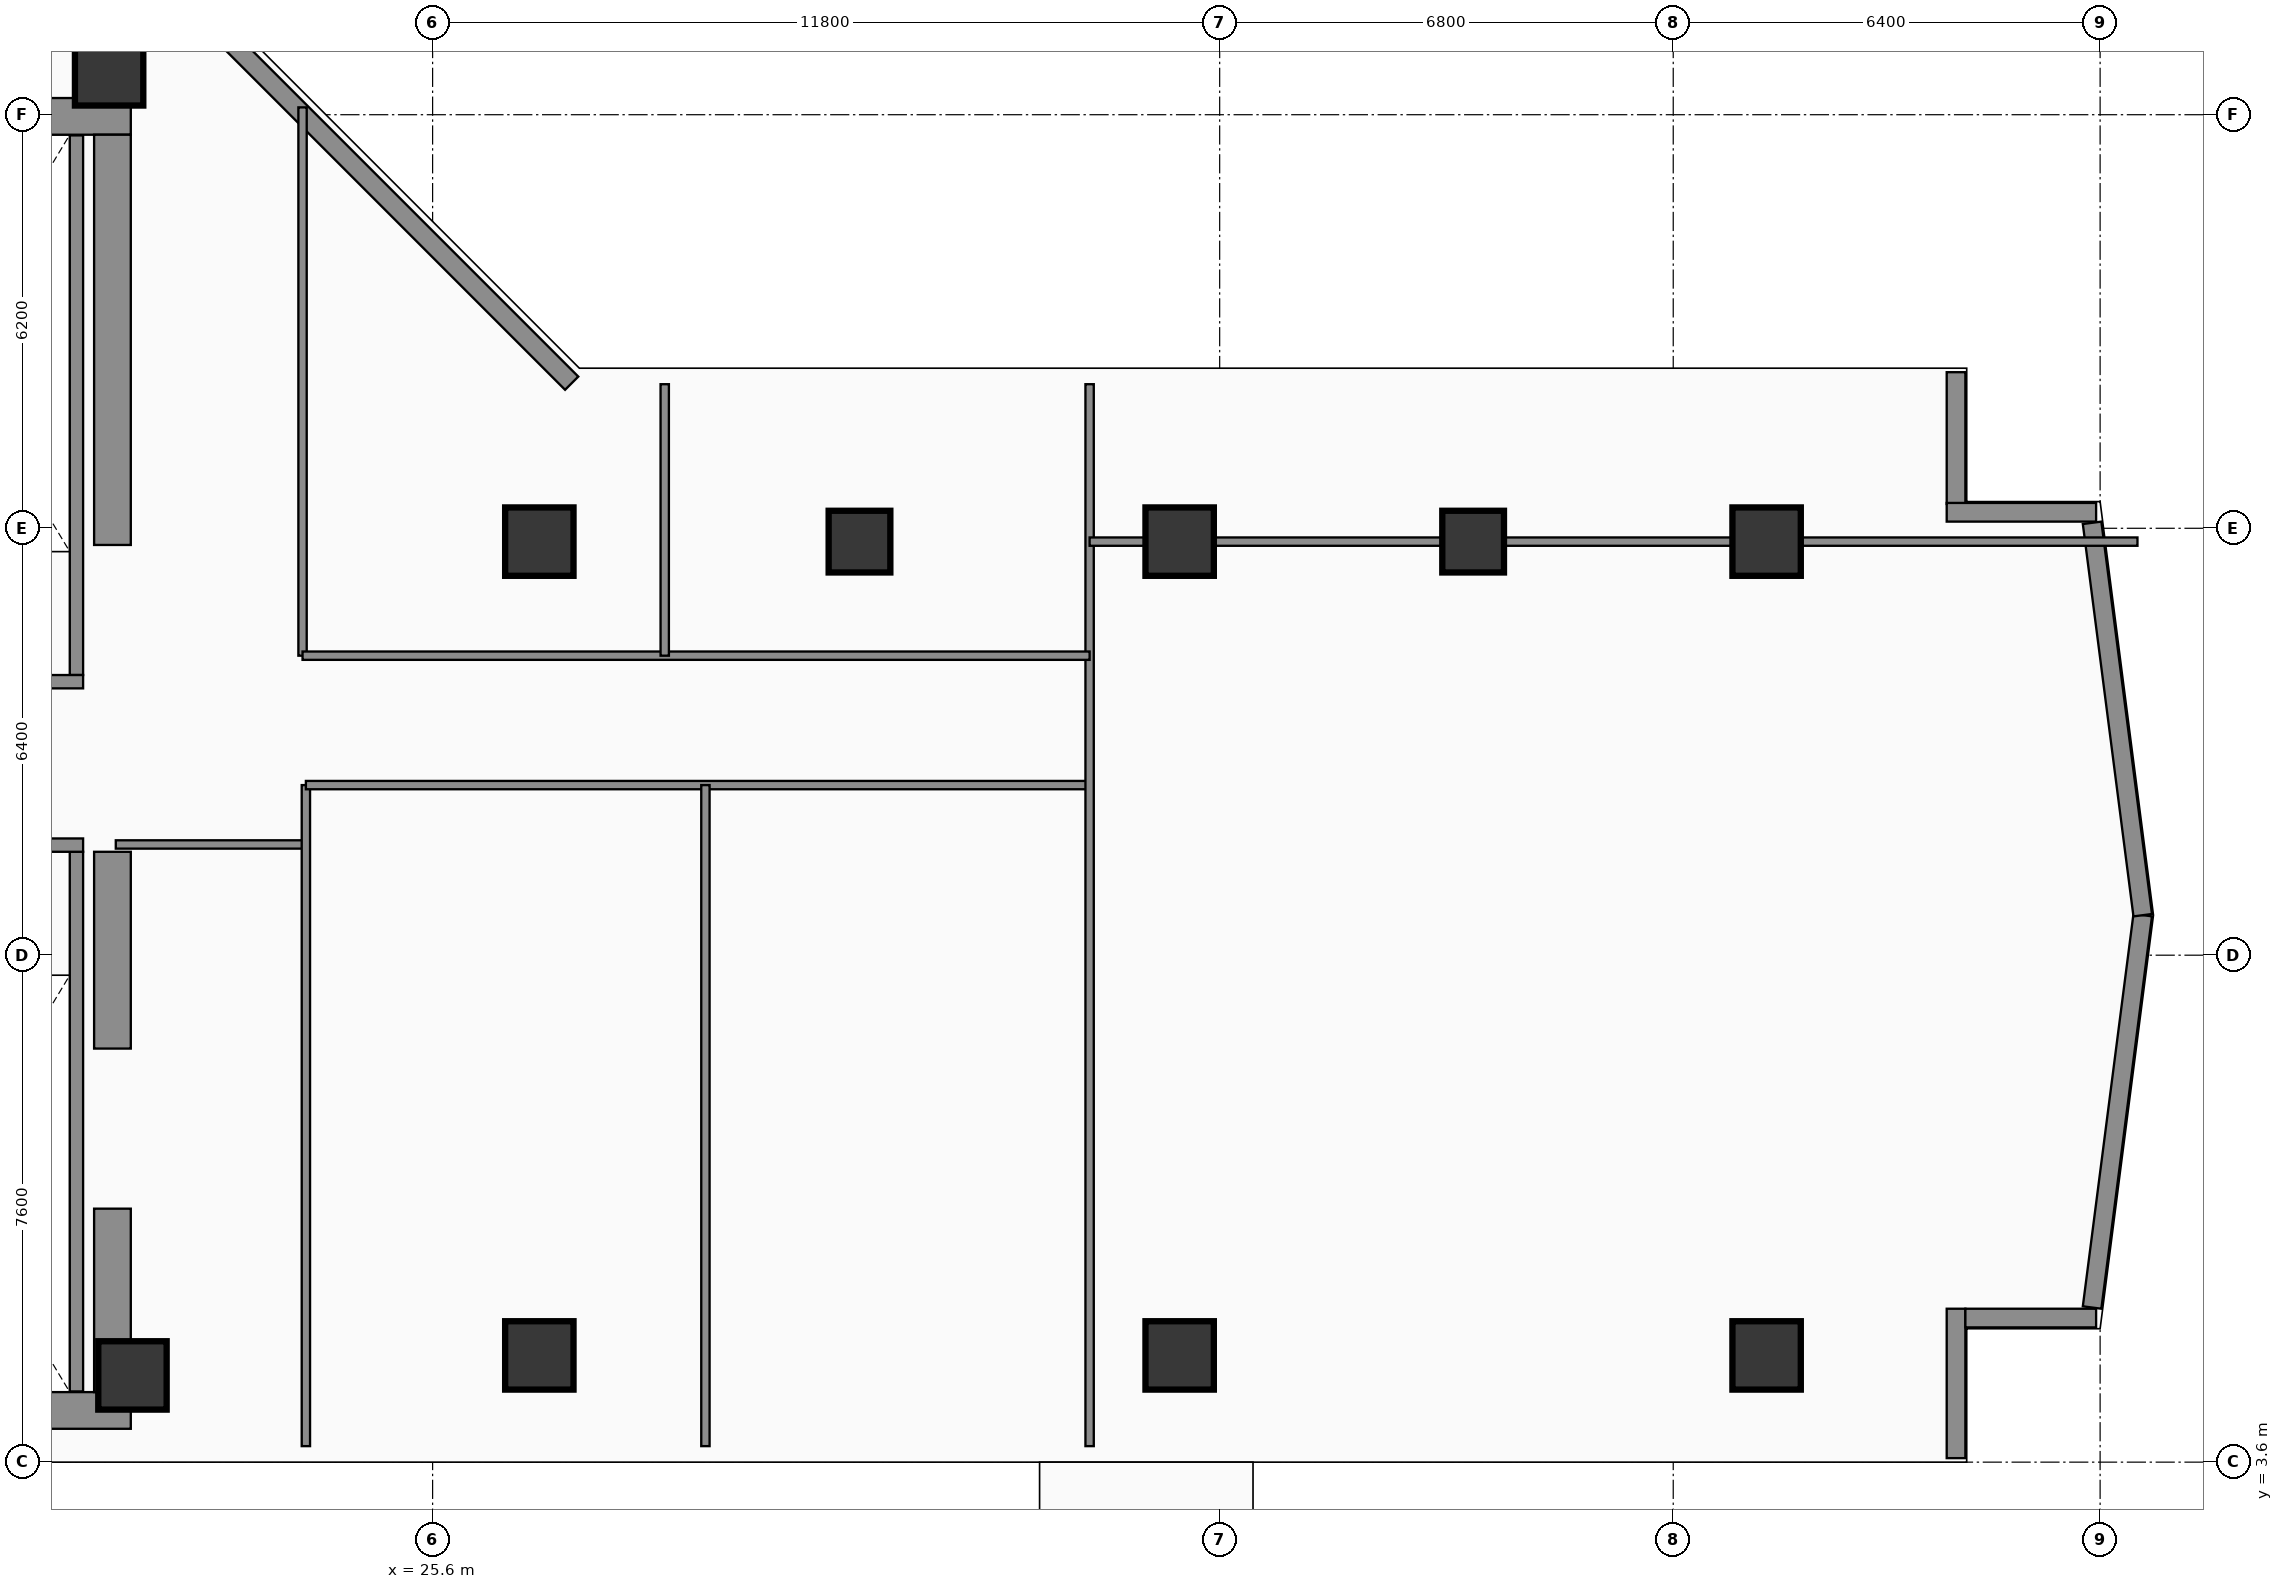
"""IFC4 building model, lengths in metres.
Left out: names, types, materials, properties, quantities, classifications, styles, units other than length and angle.
Written with IfcOpenShell. Run it as: python <this file> out.ifc"""

import sys

from ifc_helpers import new_model, si_unit, direction, frame, frame_2d, origin, origin_2d, place, context, subcontext, project, spatial, rectangle, extrude, element, fill, save


model = new_model("IFC4")
c1 = context("Model", 3, precision=1e-05, world=origin(), true_north=direction((0.0, 1.0)))
c2 = subcontext(c1, "Body", "Model", "MODEL_VIEW")
j1 = project(units=[si_unit("LENGTHUNIT", "METRE"), si_unit("PLANEANGLEUNIT", "RADIAN")], contexts=[c1])
p1 = place(None, origin())
s1 = spatial("IfcSite", under=j1, at=p1, CompositionType="ELEMENT")
p2 = place(p1, origin())
s2 = spatial("IfcBuilding", under=s1, at=p2, CompositionType="ELEMENT")
p3 = place(p2, frame((0.0, 0.0, 223.5)))
s3 = spatial("IfcBuildingStorey", under=s2, at=p3, CompositionType="ELEMENT", Elevation=223.5)
for number, where, z_axis, x_axis in (
    (1, (7.175, 4.375, 0.0), (0.0, 0.0, 1.0), (1.0, 0.0, 0.0)),
    (2, (7.175, 23.775, 0.0), (0.0, 0.0, 1.0), (1.0, 0.0, 0.0)),
):
    element("IfcWall", number, at=place(p3, frame(where, z_axis=z_axis, x_axis=x_axis)), inside=s3, PredefinedType="SHEAR", context=c2, shape_type="SweptSolid", body=[
        extrude(rectangle(XDim=13.9, YDim=0.55, at=frame_2d((6.95, 0.0))), origin(), (0.0, 0.0, 1.0), 3.56),
    ])
p4 = place(p3, frame((20.8, 4.65, 0.0), z_axis=(0.0, 0.0, 1.0), x_axis=(0.0, 1.0, 0.0)))
e3 = element("IfcWall", 3, at=p4, inside=s3, PredefinedType="SHEAR", context=c2, shape_type="SweptSolid", body=[
    extrude(rectangle(XDim=2.75, YDim=0.55, at=frame_2d((1.375, 0.0))), origin(), (0.0, 0.0, 1.0), 3.56),
])
p5 = place(p3, frame((20.8, 9.8, 0.0), z_axis=(0.0, 0.0, 1.0), x_axis=(0.0, 1.0, 0.0)))
e4 = element("IfcWall", 4, at=p5, inside=s3, PredefinedType="SHEAR", context=c2, shape_type="SweptSolid", body=[
    extrude(rectangle(XDim=2.95, YDim=0.55, at=frame_2d((1.475, 0.0))), origin(), (0.0, 0.0, 1.0), 3.56),
])
p6 = place(p3, frame((20.8, 17.35, 0.0), z_axis=(0.0, 0.0, 1.0), x_axis=(0.0, 1.0, 0.0)))
e5 = element("IfcWall", 5, at=p6, inside=s3, PredefinedType="SHEAR", context=c2, shape_type="SweptSolid", body=[
    extrude(rectangle(XDim=6.15, YDim=0.55, at=frame_2d((3.075, 0.0))), origin(), (0.0, 0.0, 1.0), 3.56),
])
for number, where, z_axis, x_axis in (
    (6, (21.1, 4.9, 0.0), (0.0, 0.0, 1.0), (1.0, 0.0, 0.0)),
    (7, (20.75, 24.45, 0.0), (0.0, 0.0, 1.0), (1.0, 0.0, 0.0)),
    (8, (27.2, 5.2, 0.0), (0.0, 0.0, 1.0), (1.0, 0.0, 0.0)),
    (9, (36.8, 5.2, 0.0), (0.0, 0.0, 1.0), (1.0, 0.0, 0.0)),
    (10, (45.6, 5.2, 0.0), (0.0, 0.0, 1.0), (1.0, 0.0, 0.0)),
    (11, (27.2, 17.4, 0.0), (0.0, 0.0, 1.0), (1.0, 0.0, 0.0)),
    (12, (36.8, 17.4, 0.0), (0.0, 0.0, 1.0), (1.0, 0.0, 0.0)),
    (13, (45.6, 17.4, 0.0), (0.0, 0.0, 1.0), (1.0, 0.0, 0.0)),
):
    element("IfcColumn", number, at=place(p3, frame(where, z_axis=z_axis, x_axis=x_axis)), inside=s3, PredefinedType="COLUMN", context=c2, shape_type="SweptSolid", body=[
        extrude(rectangle(XDim=1.0, YDim=1.0, at=origin_2d()), origin(), (0.0, 0.0, 1.0), 3.56),
    ])
for number, where, z_axis, x_axis in (
    (14, (32.0, 17.4, 0.0), (0.0, 0.0, 1.0), (1.0, 0.0, 0.0)),
    (15, (41.2, 17.4, 0.0), (0.0, 0.0, 1.0), (1.0, 0.0, 0.0)),
):
    element("IfcColumn", number, at=place(p3, frame(where, z_axis=z_axis, x_axis=x_axis)), inside=s3, PredefinedType="COLUMN", context=c2, shape_type="SweptSolid", body=[
        extrude(rectangle(XDim=0.9, YDim=0.9, at=origin_2d()), origin(), (0.0, 0.0, 1.0), 3.56),
    ])
p7 = place(p3, frame((48.44, 3.66, 0.0), z_axis=(0.0, 0.0, 1.0), x_axis=(0.0, 1.0, 0.0)))
e16 = element("IfcWall", 16, at=p7, inside=s3, PredefinedType="SOLIDWALL", context=c2, shape_type="SweptSolid", body=[
    extrude(rectangle(XDim=2.24, YDim=0.28, at=frame_2d((1.12, 0.0))), origin(), (0.0, 0.0, 1.0), 3.56),
])
p8 = place(p3, frame((48.58, 5.76, 0.0), z_axis=(0.0, 0.0, 1.0), x_axis=(1.0, 0.0, 0.0)))
e17 = element("IfcWall", 17, at=p8, inside=s3, PredefinedType="SOLIDWALL", context=c2, shape_type="SweptSolid", body=[
    extrude(rectangle(XDim=1.96, YDim=0.28, at=frame_2d((0.98, 0.0))), origin(), (0.0, 0.0, 1.0), 3.56),
])
p9 = place(p3, frame((48.44, 17.965, 0.0), z_axis=(0.0, 0.0, 1.0), x_axis=(0.0, 1.0, 0.0)))
e18 = element("IfcWall", 18, at=p9, inside=s3, PredefinedType="SOLIDWALL", context=c2, shape_type="SweptSolid", body=[
    extrude(rectangle(XDim=1.975, YDim=0.28, at=frame_2d((0.987, 0.0))), origin(), (0.0, 0.0, 1.0), 3.56),
])
p10 = place(p3, frame((48.3, 17.84, 0.0), z_axis=(0.0, 0.0, 1.0), x_axis=(1.0, 0.0, 0.0)))
e19 = element("IfcWall", 19, at=p10, inside=s3, PredefinedType="SOLIDWALL", context=c2, shape_type="SweptSolid", body=[
    extrude(rectangle(XDim=2.24, YDim=0.28, at=frame_2d((1.12, 0.0))), origin(), (0.0, 0.0, 1.0), 3.56),
])
p11 = place(p3, frame((27.685, 19.775, 0.0), z_axis=(0.0, 0.0, 1.0), x_axis=(-0.707106781187, 0.707106781187, 0.0)))
e20 = element("IfcWall", 20, at=p11, inside=s3, PredefinedType="SOLIDWALL", context=c2, shape_type="SweptSolid", body=[
    extrude(rectangle(XDim=9.207, YDim=0.28, at=frame_2d((4.603, 0.0))), origin(), (0.0, 0.0, 1.0), 3.56),
])
for number, where, z_axis, x_axis in (
    (21, (50.48, 5.918, 0.0), (0.0, 0.0, 1.0), (0.128, 0.992, 0.0)),
    (22, (51.239, 11.799, 0.0), (0.0, 0.0, 1.0), (-0.128, 0.992, 0.0)),
):
    element("IfcWall", number, at=place(p3, frame(where, z_axis=z_axis, x_axis=x_axis)), inside=s3, PredefinedType="SOLIDWALL", context=c2, shape_type="SweptSolid", body=[
        extrude(rectangle(XDim=5.931, YDim=0.28, at=frame_2d((2.966, 0.0))), origin(), (0.0, 0.0, 1.0), 3.56),
    ])
p12 = place(p3, frame((20.26, 4.66, 0.0), z_axis=(0.0, 0.0, 1.0), x_axis=(0.0, 1.0, 0.0)))
e23 = element("IfcWall", 23, at=p12, inside=s3, PredefinedType="SHEAR", context=c2, shape_type="SweptSolid", body=[
    extrude(rectangle(XDim=8.09, YDim=0.2, at=frame_2d((4.045, 0.0))), origin(), (0.0, 0.0, 1.0), 3.56),
])
p13 = place(p3, frame((16.4, 12.85, 0.0), z_axis=(0.0, 0.0, 1.0), x_axis=(1.0, 0.0, 0.0)))
e24 = element("IfcWall", 24, at=p13, inside=s3, PredefinedType="PARTITIONING", context=c2, shape_type="SweptSolid", body=[
    extrude(rectangle(XDim=3.96, YDim=0.2, at=frame_2d((1.98, 0.0))), origin(), (0.0, 0.0, 1.0), 3.56),
])
p14 = place(p13, frame((1.304, 0.0, 0.0)))
e25 = element("IfcOpeningElement", 25, at=p14, cuts=e24, PredefinedType="OPENING", context=c2, shape_type="SweptSolid", body=[
    extrude(rectangle(XDim=1.1, YDim=2.2, at=frame_2d((0.55, 1.1))), frame((0.0, 0.11, 0.0), z_axis=(0.0, -1.0, 0.0), x_axis=(1.0, 0.0, 0.0)), (0.0, 0.0, 1.0), 0.22),
])
p15 = place(p3, frame((20.26, 15.4, 0.0), z_axis=(0.0, 0.0, 1.0), x_axis=(0.0, 1.0, 0.0)))
e26 = element("IfcWall", 26, at=p15, inside=s3, PredefinedType="SHEAR", context=c2, shape_type="SweptSolid", body=[
    extrude(rectangle(XDim=8.09, YDim=0.2, at=frame_2d((4.045, 0.0))), origin(), (0.0, 0.0, 1.0), 3.56),
])
p16 = place(p3, frame((16.41, 15.3, 0.0), z_axis=(0.0, 0.0, 1.0), x_axis=(1.0, 0.0, 0.0)))
e27 = element("IfcWall", 27, at=p16, inside=s3, PredefinedType="PARTITIONING", context=c2, shape_type="SweptSolid", body=[
    extrude(rectangle(XDim=3.95, YDim=0.2, at=frame_2d((1.975, 0.0))), origin(), (0.0, 0.0, 1.0), 3.56),
])
p17 = place(p16, frame((1.294, 0.0, 0.0)))
e28 = element("IfcOpeningElement", 28, at=p17, cuts=e27, PredefinedType="OPENING", context=c2, shape_type="SweptSolid", body=[
    extrude(rectangle(XDim=1.1, YDim=2.2, at=frame_2d((0.55, 1.1))), frame((0.0, 0.11, 0.0), z_axis=(0.0, -1.0, 0.0), x_axis=(1.0, 0.0, 0.0)), (0.0, 0.0, 1.0), 0.22),
])
p18 = place(p3, frame((20.85, 12.86, 0.0), z_axis=(0.0, 0.0, 1.0), x_axis=(1.0, 0.0, 0.0)))
e29 = element("IfcWall", 29, at=p18, inside=s3, PredefinedType="PARTITIONING", context=c2, shape_type="SweptSolid", body=[
    extrude(rectangle(XDim=2.85, YDim=0.125, at=frame_2d((1.425, 0.0))), origin(), (0.0, 0.0, 1.0), 3.56),
])
p19 = place(p18, frame((0.971, 0.0, 0.0)))
e30 = element("IfcOpeningElement", 30, at=p19, cuts=e29, PredefinedType="OPENING", context=c2, shape_type="SweptSolid", body=[
    extrude(rectangle(XDim=0.95, YDim=2.15, at=frame_2d((0.475, 1.075))), frame((0.0, 0.073, 0.0), z_axis=(0.0, -1.0, 0.0), x_axis=(1.0, 0.0, 0.0)), (0.0, 0.0, 1.0), 0.145),
])
p20 = place(p3, frame((23.7, 3.84, 0.0), z_axis=(0.0, 0.0, 1.0), x_axis=(0.0, 1.0, 0.0)))
e31 = element("IfcWall", 31, at=p20, inside=s3, PredefinedType="PARTITIONING", context=c2, shape_type="SweptSolid", body=[
    extrude(rectangle(XDim=9.91, YDim=0.125, at=frame_2d((4.955, 0.0))), origin(), (0.0, 0.0, 1.0), 3.56),
])
p21 = place(p3, frame((23.7, 13.75, 0.0), z_axis=(0.0, 0.0, 1.0), x_axis=(1.0, 0.0, 0.0)))
e32 = element("IfcWall", 32, at=p21, inside=s3, PredefinedType="PARTITIONING", context=c2, shape_type="SweptSolid", body=[
    extrude(rectangle(XDim=11.75, YDim=0.125, at=frame_2d((5.875, 0.0))), origin(), (0.0, 0.0, 1.0), 3.2),
])
p22 = place(p21, frame((2.52, 0.0, 0.0)))
e33 = element("IfcOpeningElement", 33, at=p22, cuts=e32, PredefinedType="OPENING", context=c2, shape_type="SweptSolid", body=[
    extrude(rectangle(XDim=0.95, YDim=2.15, at=frame_2d((0.475, 1.075))), frame((0.0, 0.073, 0.0), z_axis=(0.0, -1.0, 0.0), x_axis=(1.0, 0.0, 0.0)), (0.0, 0.0, 1.0), 0.145),
])
p23 = place(p21, frame((7.847, 0.0, 0.0)))
e34 = element("IfcOpeningElement", 34, at=p23, cuts=e32, PredefinedType="OPENING", context=c2, shape_type="SweptSolid", body=[
    extrude(rectangle(XDim=0.95, YDim=2.15, at=frame_2d((0.475, 1.075))), frame((0.0, 0.073, 0.0), z_axis=(0.0, -1.0, 0.0), x_axis=(1.0, 0.0, 0.0)), (0.0, 0.0, 1.0), 0.145),
])
p24 = place(p3, frame((29.69, 3.84, 0.0), z_axis=(0.0, 0.0, 1.0), x_axis=(0.0, 1.0, 0.0)))
e35 = element("IfcWall", 35, at=p24, inside=s3, PredefinedType="PARTITIONING", context=c2, shape_type="SweptSolid", body=[
    extrude(rectangle(XDim=9.91, YDim=0.125, at=frame_2d((4.955, 0.0))), origin(), (0.0, 0.0, 1.0), 3.56),
])
p25 = place(p3, frame((35.45, 3.84, 0.0), z_axis=(0.0, 0.0, 1.0), x_axis=(0.0, 1.0, 0.0)))
e36 = element("IfcWall", 36, at=p25, inside=s3, PredefinedType="PARTITIONING", context=c2, shape_type="SweptSolid", body=[
    extrude(rectangle(XDim=15.92, YDim=0.125, at=frame_2d((7.96, 0.0))), origin(), (0.0, 0.0, 1.0), 3.56),
])
p26 = place(p25, frame((10.31, 0.0, 0.0)))
e37 = element("IfcOpeningElement", 37, at=p26, cuts=e36, PredefinedType="OPENING", context=c2, shape_type="SweptSolid", body=[
    extrude(rectangle(XDim=1.0, YDim=2.2, at=frame_2d((0.5, 1.1))), frame((0.0, 0.073, 0.0), z_axis=(0.0, -1.0, 0.0), x_axis=(1.0, 0.0, 0.0)), (0.0, 0.0, 1.0), 0.145),
])
p27 = place(p3, frame((35.45, 17.4, 0.0), z_axis=(0.0, 0.0, 1.0), x_axis=(1.0, 0.0, 0.0)))
e38 = element("IfcWall", 38, at=p27, inside=s3, PredefinedType="PARTITIONING", context=c2, shape_type="SweptSolid", body=[
    extrude(rectangle(XDim=15.71, YDim=0.125, at=frame_2d((7.855, 0.0))), origin(), (0.0, 0.0, 1.0), 3.26),
])
p28 = place(p27, frame((2.95, 0.0, 0.0)))
e39 = element("IfcOpeningElement", 39, at=p28, cuts=e38, PredefinedType="OPENING", context=c2, shape_type="SweptSolid", body=[
    extrude(rectangle(XDim=0.95, YDim=2.15, at=frame_2d((0.475, 1.075))), frame((0.0, 0.073, 0.0), z_axis=(0.0, -1.0, 0.0), x_axis=(1.0, 0.0, 0.0)), (0.0, 0.0, 1.0), 0.145),
])
p29 = place(p3, frame((23.65, 15.69, 0.0), z_axis=(0.0, 0.0, 1.0), x_axis=(0.0, 1.0, 0.0)))
e40 = element("IfcWall", 40, at=p29, inside=s3, PredefinedType="PARTITIONING", context=c2, shape_type="SweptSolid", body=[
    extrude(rectangle(XDim=8.22, YDim=0.125, at=frame_2d((4.11, 0.0))), origin(), (0.0, 0.0, 1.0), 3.56),
])
p30 = place(p3, frame((23.65, 15.69, 0.0), z_axis=(0.0, 0.0, 1.0), x_axis=(1.0, 0.0, 0.0)))
e41 = element("IfcWall", 41, at=p30, inside=s3, PredefinedType="PARTITIONING", context=c2, shape_type="SweptSolid", body=[
    extrude(rectangle(XDim=11.8, YDim=0.125, at=frame_2d((5.9, 0.0))), origin(), (0.0, 0.0, 1.0), 3.2),
])
p31 = place(p30, frame((1.674, 0.0, 0.0)))
e42 = element("IfcOpeningElement", 42, at=p31, cuts=e41, PredefinedType="OPENING", context=c2, shape_type="SweptSolid", body=[
    extrude(rectangle(XDim=0.95, YDim=2.15, at=frame_2d((0.475, 1.075))), frame((0.0, 0.073, 0.0), z_axis=(0.0, -1.0, 0.0), x_axis=(1.0, 0.0, 0.0)), (0.0, 0.0, 1.0), 0.145),
])
p32 = place(p30, frame((9.19, 0.0, 0.0)))
e43 = element("IfcOpeningElement", 43, at=p32, cuts=e41, PredefinedType="OPENING", context=c2, shape_type="SweptSolid", body=[
    extrude(rectangle(XDim=0.95, YDim=2.15, at=frame_2d((0.475, 1.075))), frame((0.0, 0.073, 0.0), z_axis=(0.0, -1.0, 0.0), x_axis=(1.0, 0.0, 0.0)), (0.0, 0.0, 1.0), 0.145),
])
p33 = place(p3, frame((29.08, 15.69, 0.0), z_axis=(0.0, 0.0, 1.0), x_axis=(0.0, 1.0, 0.0)))
e44 = element("IfcWall", 44, at=p33, inside=s3, PredefinedType="PARTITIONING", context=c2, shape_type="SweptSolid", body=[
    extrude(rectangle(XDim=4.07, YDim=0.125, at=frame_2d((2.035, 0.0))), origin(), (0.0, 0.0, 1.0), 3.56),
])
p34 = place(p19, origin())
e45 = element("IfcDoor", 45, at=p34, inside=s3, OperationType="SINGLE_SWING_LEFT", PredefinedType="DOOR", context=c2, shape_type="SweptSolid", body=[
    extrude(rectangle(XDim=0.95, YDim=2.15, at=frame_2d((0.475, 1.075))), frame((0.0, 0.025, 0.0), z_axis=(0.0, -1.0, 0.0), x_axis=(1.0, 0.0, 0.0)), (0.0, 0.0, 1.0), 0.05),
])
fill(e30, e45)
p35 = place(p22, origin())
e46 = element("IfcDoor", 46, at=p35, inside=s3, OperationType="SINGLE_SWING_RIGHT", PredefinedType="DOOR", context=c2, shape_type="SweptSolid", body=[
    extrude(rectangle(XDim=0.95, YDim=2.15, at=frame_2d((0.475, 1.075))), frame((0.0, 0.025, 0.0), z_axis=(0.0, -1.0, 0.0), x_axis=(1.0, 0.0, 0.0)), (0.0, 0.0, 1.0), 0.05),
])
fill(e33, e46)
p36 = place(p23, origin())
e47 = element("IfcDoor", 47, at=p36, inside=s3, OperationType="SINGLE_SWING_LEFT", PredefinedType="DOOR", context=c2, shape_type="SweptSolid", body=[
    extrude(rectangle(XDim=0.95, YDim=2.15, at=frame_2d((0.475, 1.075))), frame((0.0, 0.025, 0.0), z_axis=(0.0, -1.0, 0.0), x_axis=(1.0, 0.0, 0.0)), (0.0, 0.0, 1.0), 0.05),
])
fill(e34, e47)
p37 = place(p26, origin())
e48 = element("IfcDoor", 48, at=p37, inside=s3, OperationType="SINGLE_SWING_RIGHT", PredefinedType="DOOR", context=c2, shape_type="SweptSolid", body=[
    extrude(rectangle(XDim=1.0, YDim=2.2, at=frame_2d((0.5, 1.1))), frame((0.0, 0.025, 0.0), z_axis=(0.0, -1.0, 0.0), x_axis=(1.0, 0.0, 0.0)), (0.0, 0.0, 1.0), 0.05),
])
fill(e37, e48)
p38 = place(p28, origin())
e49 = element("IfcDoor", 49, at=p38, inside=s3, OperationType="SINGLE_SWING_LEFT", PredefinedType="DOOR", context=c2, shape_type="SweptSolid", body=[
    extrude(rectangle(XDim=0.95, YDim=2.15, at=frame_2d((0.475, 1.075))), frame((0.0, 0.025, 0.0), z_axis=(0.0, -1.0, 0.0), x_axis=(1.0, 0.0, 0.0)), (0.0, 0.0, 1.0), 0.05),
])
fill(e39, e49)
p39 = place(p31, origin())
e50 = element("IfcDoor", 50, at=p39, inside=s3, OperationType="SINGLE_SWING_RIGHT", PredefinedType="DOOR", context=c2, shape_type="SweptSolid", body=[
    extrude(rectangle(XDim=0.95, YDim=2.15, at=frame_2d((0.475, 1.075))), frame((0.0, 0.025, 0.0), z_axis=(0.0, -1.0, 0.0), x_axis=(1.0, 0.0, 0.0)), (0.0, 0.0, 1.0), 0.05),
])
fill(e42, e50)
p40 = place(p32, origin())
e51 = element("IfcDoor", 51, at=p40, inside=s3, OperationType="SINGLE_SWING_LEFT", PredefinedType="DOOR", context=c2, shape_type="SweptSolid", body=[
    extrude(rectangle(XDim=0.95, YDim=2.15, at=frame_2d((0.475, 1.075))), frame((0.0, 0.025, 0.0), z_axis=(0.0, -1.0, 0.0), x_axis=(1.0, 0.0, 0.0)), (0.0, 0.0, 1.0), 0.05),
])
fill(e43, e51)
save(model, sys.argv[1])
